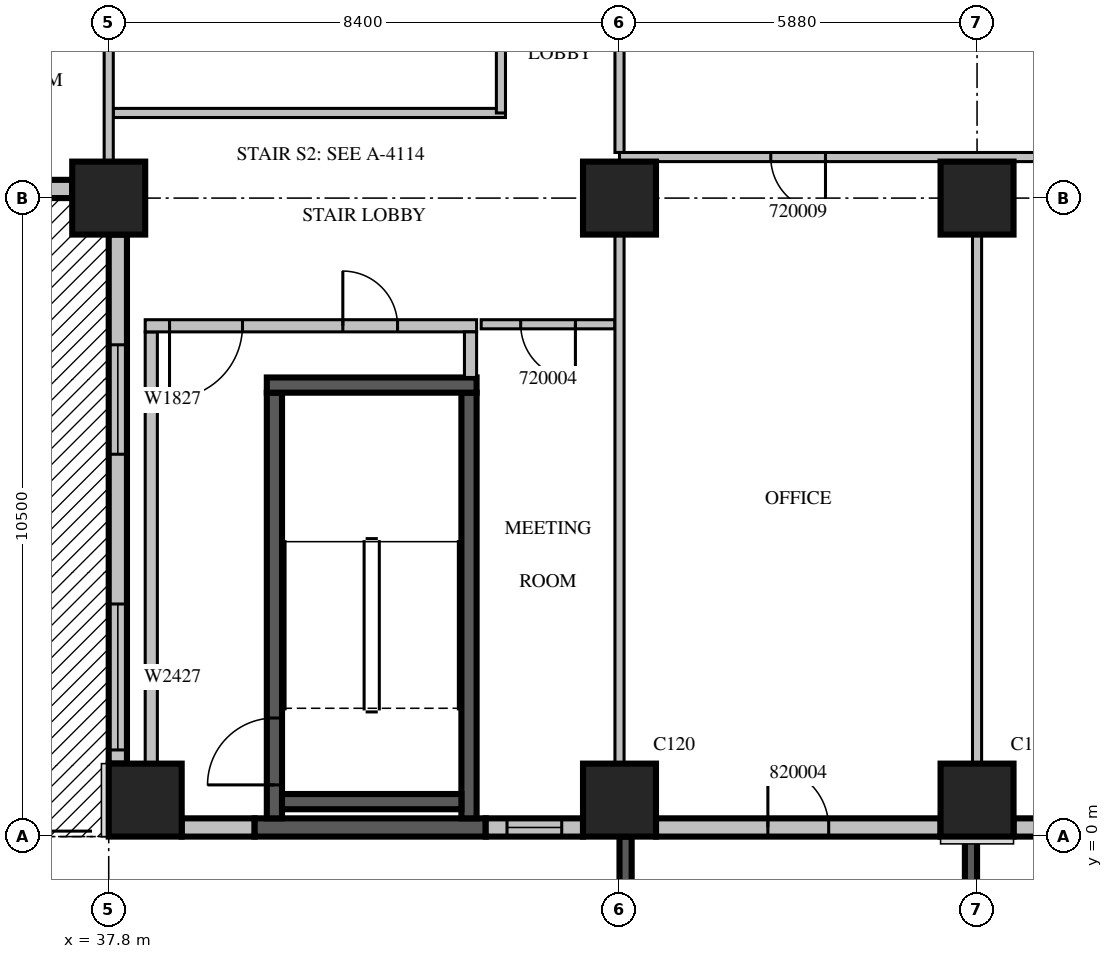
"""IFC4 building model, lengths in metres.
Left out: names, types, materials, properties, quantities, classifications, styles, units other than length and angle.
Written with IfcOpenShell. Run it as: python <this file> out.ifc"""

import sys

from ifc_helpers import new_model, si_unit, direction, frame, frame_2d, origin, origin_2d, place, context, subcontext, project, spatial, rectangle, extrude, source, transform, mapped, element, fill, save


model = new_model("IFC4")
c1 = context("Model", 3, precision=1e-05, world=origin(), true_north=direction((0.0, 1.0)))
c2 = subcontext(c1, "Body", "Model", "MODEL_VIEW")
j1 = project(units=[si_unit("LENGTHUNIT", "METRE"), si_unit("PLANEANGLEUNIT", "RADIAN")], contexts=[c1])
p1 = place(None, origin())
s1 = spatial("IfcSite", under=j1, at=p1, CompositionType="ELEMENT")
p2 = place(p1, origin())
s2 = spatial("IfcBuilding", under=s1, at=p2, CompositionType="ELEMENT")
p3 = place(p2, frame((0.0, 0.0, 95.1)))
s3 = spatial("IfcBuildingStorey", under=s2, at=p3, CompositionType="ELEMENT", Elevation=95.1)
m1 = source(origin(), c2, "Body", "SweptSolid", [
    extrude(rectangle(XDim=1.2, YDim=1.2, at=origin_2d()), origin(), (0.0, 0.0, 1.0), 4.2),
])
for number, where, z_axis, x_axis in (
    (1, (38.4, 0.6, 0.0), (0.0, 0.0, 1.0), (1.0, 0.0, 0.0)),
    (2, (46.2, 0.6, 0.0), (0.0, 0.0, 1.0), (1.0, 0.0, 0.0)),
    (3, (52.08, 0.6, 0.0), (0.0, 0.0, 1.0), (1.0, 0.0, 0.0)),
    (4, (37.8, 10.5, 0.0), (0.0, 0.0, 1.0), (1.0, 0.0, 0.0)),
    (5, (46.2, 10.5, 0.0), (0.0, 0.0, 1.0), (1.0, 0.0, 0.0)),
    (6, (52.08, 10.5, 0.0), (0.0, 0.0, 1.0), (1.0, 0.0, 0.0)),
):
    element("IfcColumn", number, at=place(p3, frame(where, z_axis=z_axis, x_axis=x_axis)), inside=s3, PredefinedType="COLUMN", context=c2, shape_type="MappedRepresentation", body=[
        mapped(m1, transform((0.0, 0.0, 0.0), scale=1.0)),
    ])
m2 = source(origin(), c2, "Body", "SweptSolid", [
    extrude(rectangle(XDim=7.2, YDim=0.3, at=frame_2d((3.6, 0.0))), origin(), (0.0, 0.0, 1.0), 3.8),
])
p4 = place(p3, frame((30.0, 10.65, 0.0), z_axis=(0.0, 0.0, 1.0), x_axis=(1.0, 0.0, 0.0)))
e7 = element("IfcWall", 7, at=p4, inside=s3, PredefinedType="STANDARD", context=c2, shape_type="MappedRepresentation", body=[
    mapped(m2, transform((0.0, 0.0, 0.0), scale=1.0)),
])
m3 = source(origin(), c2, "Body", "SweptSolid", [
    extrude(rectangle(XDim=1.8, YDim=2.4, at=frame_2d((0.9, 1.2))), frame((0.0, 0.16, 0.0), z_axis=(0.0, -1.0, 0.0), x_axis=(1.0, 0.0, 0.0)), (0.0, 0.0, 1.0), 0.32),
])
p5 = place(p4, frame((0.6, 0.0, 0.0)))
e8 = element("IfcOpeningElement", 8, at=p5, cuts=e7, PredefinedType="OPENING", context=c2, shape_type="MappedRepresentation", body=[
    mapped(m3, transform((0.0, 0.0, 0.0), scale=1.0)),
])
m4 = source(origin(), c2, "Body", "SweptSolid", [
    extrude(rectangle(XDim=1.2, YDim=2.7, at=frame_2d((0.6, 1.35))), frame((0.0, 0.16, 0.0), z_axis=(0.0, -1.0, 0.0), x_axis=(1.0, 0.0, 0.0)), (0.0, 0.0, 1.0), 0.32),
])
p6 = place(p4, frame((3.807, 0.0, 0.6)))
e9 = element("IfcOpeningElement", 9, at=p6, cuts=e7, PredefinedType="OPENING", context=c2, shape_type="MappedRepresentation", body=[
    mapped(m4, transform((0.0, 0.0, 0.0), scale=1.0)),
])
m5 = source(origin(), c2, "Body", "SweptSolid", [
    extrude(rectangle(XDim=8.7, YDim=0.3, at=frame_2d((4.35, 0.0))), origin(), (0.0, 0.0, 1.0), 3.8),
])
p7 = place(p3, frame((37.95, 9.9, 0.0), z_axis=(0.0, 0.0, 1.0), x_axis=(0.0, -1.0, 0.0)))
e10 = element("IfcWall", 10, at=p7, inside=s3, PredefinedType="STANDARD", context=c2, shape_type="MappedRepresentation", body=[
    mapped(m5, transform((0.0, 0.0, 0.0), scale=1.0)),
])
m6 = source(origin(), c2, "Body", "SweptSolid", [
    extrude(rectangle(XDim=1.8, YDim=2.7, at=frame_2d((0.9, 1.35))), frame((0.0, 0.16, 0.0), z_axis=(0.0, -1.0, 0.0), x_axis=(1.0, 0.0, 0.0)), (0.0, 0.0, 1.0), 0.32),
])
p8 = place(p7, frame((1.812, 0.0, 0.6)))
e11 = element("IfcOpeningElement", 11, at=p8, cuts=e10, PredefinedType="OPENING", context=c2, shape_type="MappedRepresentation", body=[
    mapped(m6, transform((0.0, 0.0, 0.0), scale=1.0)),
])
m7 = source(origin(), c2, "Body", "SweptSolid", [
    extrude(rectangle(XDim=2.4, YDim=2.7, at=frame_2d((1.2, 1.35))), frame((0.0, 0.16, 0.0), z_axis=(0.0, -1.0, 0.0), x_axis=(1.0, 0.0, 0.0)), (0.0, 0.0, 1.0), 0.32),
])
p9 = place(p7, frame((6.075, 0.0, 0.6)))
e12 = element("IfcOpeningElement", 12, at=p9, cuts=e10, PredefinedType="OPENING", context=c2, shape_type="MappedRepresentation", body=[
    mapped(m7, transform((0.0, 0.0, 0.0), scale=1.0)),
])
m8 = source(origin(), c2, "Body", "SweptSolid", [
    extrude(rectangle(XDim=1.2, YDim=0.3, at=frame_2d((0.6, 0.0))), origin(), (0.0, 0.0, 1.0), 3.8),
])
p10 = place(p3, frame((39.0, 0.15, 0.0), z_axis=(0.0, 0.0, 1.0), x_axis=(1.0, 0.0, 0.0)))
e13 = element("IfcWall", 13, at=p10, inside=s3, PredefinedType="STANDARD", context=c2, shape_type="MappedRepresentation", body=[
    mapped(m8, transform((0.0, 0.0, 0.0), scale=1.0)),
])
m9 = source(origin(), c2, "Body", "SweptSolid", [
    extrude(rectangle(XDim=3.8, YDim=0.3, at=frame_2d((1.9, 0.0))), origin(), (0.0, 0.0, 1.0), 3.8),
])
p11 = place(p3, frame((40.2, 0.15, 0.0), z_axis=(0.0, 0.0, 1.0), x_axis=(1.0, 0.0, 0.0)))
e14 = element("IfcWall", 14, at=p11, inside=s3, PredefinedType="SOLIDWALL", context=c2, shape_type="MappedRepresentation", body=[
    mapped(m9, transform((0.0, 0.0, 0.0), scale=1.0)),
])
m10 = source(origin(), c2, "Body", "SweptSolid", [
    extrude(rectangle(XDim=1.6, YDim=0.3, at=frame_2d((0.8, 0.0))), origin(), (0.0, 0.0, 1.0), 3.8),
])
p12 = place(p3, frame((44.0, 0.15, 0.0), z_axis=(0.0, 0.0, 1.0), x_axis=(1.0, 0.0, 0.0)))
e15 = element("IfcWall", 15, at=p12, inside=s3, PredefinedType="STANDARD", context=c2, shape_type="MappedRepresentation", body=[
    mapped(m10, transform((0.0, 0.0, 0.0), scale=1.0)),
])
m11 = source(origin(), c2, "Body", "SweptSolid", [
    extrude(rectangle(XDim=0.9, YDim=2.7, at=frame_2d((0.45, 1.35))), frame((0.0, 0.16, 0.0), z_axis=(0.0, -1.0, 0.0), x_axis=(1.0, 0.0, 0.0)), (0.0, 0.0, 1.0), 0.32),
])
p13 = place(p12, frame((0.35, 0.0, 0.6)))
e16 = element("IfcOpeningElement", 16, at=p13, cuts=e15, PredefinedType="OPENING", context=c2, shape_type="MappedRepresentation", body=[
    mapped(m11, transform((0.0, 0.0, 0.0), scale=1.0)),
])
m12 = source(origin(), c2, "Body", "SweptSolid", [
    extrude(rectangle(XDim=4.68, YDim=0.3, at=frame_2d((2.34, 0.0))), origin(), (0.0, 0.0, 1.0), 3.8),
])
p14 = place(p3, frame((46.8, 0.15, 0.0), z_axis=(0.0, 0.0, 1.0), x_axis=(1.0, 0.0, 0.0)))
e17 = element("IfcWall", 17, at=p14, inside=s3, PredefinedType="STANDARD", context=c2, shape_type="MappedRepresentation", body=[
    mapped(m12, transform((0.0, 0.0, 0.0), scale=1.0)),
])
m13 = source(origin(), c2, "Body", "SweptSolid", [
    extrude(rectangle(XDim=1.0, YDim=2.1, at=frame_2d((0.5, 1.05))), frame((0.0, 0.16, 0.0), z_axis=(0.0, -1.0, 0.0), x_axis=(1.0, 0.0, 0.0)), (0.0, 0.0, 1.0), 0.32),
])
p15 = place(p14, frame((1.84, 0.0, 0.0)))
e18 = element("IfcOpeningElement", 18, at=p15, cuts=e17, PredefinedType="OPENING", context=c2, shape_type="MappedRepresentation", body=[
    mapped(m13, transform((0.0, 0.0, 0.0), scale=1.0)),
])
p16 = place(p3, frame((52.68, 0.15, 0.0), z_axis=(0.0, 0.0, 1.0), x_axis=(1.0, 0.0, 0.0)))
e19 = element("IfcWall", 19, at=p16, inside=s3, PredefinedType="STANDARD", context=c2, shape_type="MappedRepresentation", body=[
    mapped(m12, transform((0.0, 0.0, 0.0), scale=1.0)),
])
m14 = source(origin(), c2, "Body", "SweptSolid", [
    extrude(rectangle(XDim=3.6, YDim=2.7, at=frame_2d((1.8, 1.35))), frame((0.0, 0.16, 0.0), z_axis=(0.0, -1.0, 0.0), x_axis=(1.0, 0.0, 0.0)), (0.0, 0.0, 1.0), 0.32),
])
p17 = place(p16, frame((0.54, 0.0, 0.6)))
e20 = element("IfcOpeningElement", 20, at=p17, cuts=e19, PredefinedType="OPENING", context=c2, shape_type="MappedRepresentation", body=[
    mapped(m14, transform((0.0, 0.0, 0.0), scale=1.0)),
])
m15 = source(origin(), c2, "Body", "SweptSolid", [
    extrude(rectangle(XDim=3.9, YDim=0.2, at=frame_2d((1.95, 0.0))), origin(), (0.0, 0.0, 1.0), 3.79),
])
p18 = place(p3, frame((46.3, 0.0, 0.0), z_axis=(0.0, 0.0, 1.0), x_axis=(0.0, -1.0, 0.0)))
e21 = element("IfcWall", 21, at=p18, inside=s3, PredefinedType="SOLIDWALL", context=c2, shape_type="MappedRepresentation", body=[
    mapped(m15, transform((0.0, 0.0, 0.0), scale=1.0)),
])
m16 = source(origin(), c2, "Body", "SweptSolid", [
    extrude(rectangle(XDim=2.4, YDim=2.7, at=frame_2d((1.2, 1.35))), frame((0.0, 0.11, 0.0), z_axis=(0.0, -1.0, 0.0), x_axis=(1.0, 0.0, 0.0)), (0.0, 0.0, 1.0), 0.22),
])
p19 = place(p18, frame((0.75, 0.0, 0.6)))
e22 = element("IfcOpeningElement", 22, at=p19, cuts=e21, PredefinedType="OPENING", context=c2, shape_type="MappedRepresentation", body=[
    mapped(m16, transform((0.0, 0.0, 0.0), scale=1.0)),
])
p20 = place(p3, frame((51.98, 0.0, 0.0), z_axis=(0.0, 0.0, 1.0), x_axis=(0.0, -1.0, 0.0)))
e23 = element("IfcWall", 23, at=p20, inside=s3, PredefinedType="SOLIDWALL", context=c2, shape_type="MappedRepresentation", body=[
    mapped(m15, transform((0.0, 0.0, 0.0), scale=1.0)),
])
p21 = place(p20, frame((0.75, 0.0, 0.6)))
e24 = element("IfcOpeningElement", 24, at=p21, cuts=e23, PredefinedType="OPENING", context=c2, shape_type="MappedRepresentation", body=[
    mapped(m16, transform((0.0, 0.0, 0.0), scale=1.0)),
])
m17 = source(origin(), c2, "Body", "SweptSolid", [
    extrude(rectangle(XDim=7.0, YDim=0.25, at=frame_2d((3.5, 0.0))), origin(), (0.0, 0.0, 1.0), 3.8),
])
p22 = place(p3, frame((40.525, 0.3, 0.0), z_axis=(0.0, 0.0, 1.0), x_axis=(0.0, 1.0, 0.0)))
e25 = element("IfcWall", 25, at=p22, inside=s3, PredefinedType="SOLIDWALL", context=c2, shape_type="MappedRepresentation", body=[
    mapped(m17, transform((0.0, 0.0, 0.0), scale=1.0)),
])
m18 = source(origin(), c2, "Body", "SweptSolid", [
    extrude(rectangle(XDim=1.1, YDim=2.1, at=frame_2d((0.55, 1.05))), frame((0.0, 0.135, 0.0), z_axis=(0.0, -1.0, 0.0), x_axis=(1.0, 0.0, 0.0)), (0.0, 0.0, 1.0), 0.27),
])
p23 = place(p22, frame((0.55, 0.0, 0.0)))
e26 = element("IfcOpeningElement", 26, at=p23, cuts=e25, PredefinedType="OPENING", context=c2, shape_type="MappedRepresentation", body=[
    mapped(m18, transform((0.0, 0.0, 0.0), scale=1.0)),
])
p24 = place(p3, frame((43.725, 0.3, 0.0), z_axis=(0.0, 0.0, 1.0), x_axis=(0.0, 1.0, 0.0)))
e27 = element("IfcWall", 27, at=p24, inside=s3, PredefinedType="SOLIDWALL", context=c2, shape_type="MappedRepresentation", body=[
    mapped(m17, transform((0.0, 0.0, 0.0), scale=1.0)),
])
m19 = source(origin(), c2, "Body", "SweptSolid", [
    extrude(rectangle(XDim=3.45, YDim=0.25, at=frame_2d((1.725, 0.0))), origin(), (0.0, 0.0, 1.0), 3.8),
])
p25 = place(p3, frame((40.4, 7.425, 0.0), z_axis=(0.0, 0.0, 1.0), x_axis=(1.0, 0.0, 0.0)))
e28 = element("IfcWall", 28, at=p25, inside=s3, PredefinedType="SOLIDWALL", context=c2, shape_type="MappedRepresentation", body=[
    mapped(m19, transform((0.0, 0.0, 0.0), scale=1.0)),
])
m20 = source(origin(), c2, "Body", "SweptSolid", [
    extrude(rectangle(XDim=2.95, YDim=0.25, at=frame_2d((1.475, 0.0))), origin(), (0.0, 0.0, 1.0), 3.8),
])
p26 = place(p3, frame((40.65, 0.575, 0.0), z_axis=(0.0, 0.0, 1.0), x_axis=(1.0, 0.0, 0.0)))
e29 = element("IfcWall", 29, at=p26, inside=s3, PredefinedType="SOLIDWALL", context=c2, shape_type="MappedRepresentation", body=[
    mapped(m20, transform((0.0, 0.0, 0.0), scale=1.0)),
])
m21 = source(origin(), c2, "Body", "SweptSolid", [
    extrude(rectangle(XDim=8.0, YDim=0.2, at=frame_2d((4.0, 0.0))), origin(), (0.0, 0.0, 1.0), 3.8),
])
p27 = place(p3, frame((38.5, 0.3, 0.0), z_axis=(0.0, 0.0, 1.0), x_axis=(0.0, 1.0, 0.0)))
e30 = element("IfcWall", 30, at=p27, inside=s3, PredefinedType="PARTITIONING", context=c2, shape_type="MappedRepresentation", body=[
    mapped(m21, transform((0.0, 0.0, 0.0), scale=1.0)),
])
m22 = source(origin(), c2, "Body", "SweptSolid", [
    extrude(rectangle(XDim=5.45, YDim=0.2, at=frame_2d((2.725, 0.0))), origin(), (0.0, 0.0, 1.0), 3.8),
])
p28 = place(p3, frame((38.4, 8.4, 0.0), z_axis=(0.0, 0.0, 1.0), x_axis=(1.0, 0.0, 0.0)))
e31 = element("IfcWall", 31, at=p28, inside=s3, PredefinedType="PARTITIONING", context=c2, shape_type="MappedRepresentation", body=[
    mapped(m22, transform((0.0, 0.0, 0.0), scale=1.0)),
])
m23 = source(origin(), c2, "Body", "SweptSolid", [
    extrude(rectangle(XDim=1.2, YDim=2.1, at=frame_2d((0.6, 1.05))), frame((0.0, 0.11, 0.0), z_axis=(0.0, -1.0, 0.0), x_axis=(1.0, 0.0, 0.0)), (0.0, 0.0, 1.0), 0.22),
])
p29 = place(p28, frame((0.4, 0.0, 0.0)))
e32 = element("IfcOpeningElement", 32, at=p29, cuts=e31, PredefinedType="OPENING", context=c2, shape_type="MappedRepresentation", body=[
    mapped(m23, transform((0.0, 0.0, 0.0), scale=1.0)),
])
m24 = source(origin(), c2, "Body", "SweptSolid", [
    extrude(rectangle(XDim=0.9, YDim=2.1, at=frame_2d((0.45, 1.05))), frame((0.0, 0.11, 0.0), z_axis=(0.0, -1.0, 0.0), x_axis=(1.0, 0.0, 0.0)), (0.0, 0.0, 1.0), 0.22),
])
p30 = place(p28, frame((3.25, 0.0, 0.0)))
e33 = element("IfcOpeningElement", 33, at=p30, cuts=e31, PredefinedType="OPENING", context=c2, shape_type="MappedRepresentation", body=[
    mapped(m24, transform((0.0, 0.0, 0.0), scale=1.0)),
])
m25 = source(origin(), c2, "Body", "SweptSolid", [
    extrude(rectangle(XDim=0.75, YDim=0.2, at=frame_2d((0.375, 0.0))), origin(), (0.0, 0.0, 1.0), 3.8),
])
p31 = place(p3, frame((43.75, 7.55, 0.0), z_axis=(0.0, 0.0, 1.0), x_axis=(0.0, 1.0, 0.0)))
e34 = element("IfcWall", 34, at=p31, inside=s3, PredefinedType="PARTITIONING", context=c2, shape_type="MappedRepresentation", body=[
    mapped(m25, transform((0.0, 0.0, 0.0), scale=1.0)),
])
m26 = source(origin(), c2, "Body", "SweptSolid", [
    extrude(rectangle(XDim=6.45, YDim=0.15, at=frame_2d((3.225, 0.0))), origin(), (0.0, 0.0, 1.0), 3.8),
])
p32 = place(p3, frame((37.875, 11.9, 0.0), z_axis=(0.0, 0.0, 1.0), x_axis=(1.0, 0.0, 0.0)))
e35 = element("IfcWall", 35, at=p32, inside=s3, PredefinedType="PARTITIONING", context=c2, shape_type="MappedRepresentation", body=[
    mapped(m26, transform((0.0, 0.0, 0.0), scale=1.0)),
])
m27 = source(origin(), c2, "Body", "SweptSolid", [
    extrude(rectangle(XDim=3.175, YDim=0.15, at=frame_2d((1.587, 0.0))), origin(), (0.0, 0.0, 1.0), 3.8),
])
p33 = place(p3, frame((44.25, 11.9, 0.0), z_axis=(0.0, 0.0, 1.0), x_axis=(0.0, 1.0, 0.0)))
e36 = element("IfcWall", 36, at=p33, inside=s3, PredefinedType="PARTITIONING", context=c2, shape_type="MappedRepresentation", body=[
    mapped(m27, transform((0.0, 0.0, 0.0), scale=1.0)),
])
m28 = source(origin(), c2, "Body", "SweptSolid", [
    extrude(rectangle(XDim=2.2, YDim=0.15, at=frame_2d((1.1, 0.0))), origin(), (0.0, 0.0, 1.0), 3.8),
])
p34 = place(p3, frame((46.125, 8.425, 0.0), z_axis=(0.0, 0.0, 1.0), x_axis=(-1.0, 0.0, 0.0)))
e37 = element("IfcWall", 37, at=p34, inside=s3, PredefinedType="PARTITIONING", context=c2, shape_type="MappedRepresentation", body=[
    mapped(m28, transform((0.0, 0.0, 0.0), scale=1.0)),
])
m29 = source(origin(), c2, "Body", "SweptSolid", [
    extrude(rectangle(XDim=0.9, YDim=2.1, at=frame_2d((0.45, 1.05))), frame((0.0, 0.085, 0.0), z_axis=(0.0, -1.0, 0.0), x_axis=(1.0, 0.0, 0.0)), (0.0, 0.0, 1.0), 0.17),
])
p35 = place(p34, frame((0.65, 0.0, 0.0)))
e38 = element("IfcOpeningElement", 38, at=p35, cuts=e37, PredefinedType="OPENING", context=c2, shape_type="MappedRepresentation", body=[
    mapped(m29, transform((0.0, 0.0, 0.0), scale=1.0)),
])
m30 = source(origin(), c2, "Body", "SweptSolid", [
    extrude(rectangle(XDim=3.901, YDim=0.15, at=frame_2d((1.95, 0.0))), origin(), (0.0, 0.0, 1.0), 3.8),
])
p36 = place(p3, frame((37.8, 11.099, 0.0), z_axis=(0.0, 0.0, 1.0), x_axis=(0.0, 1.0, 0.0)))
e39 = element("IfcWall", 39, at=p36, inside=s3, PredefinedType="PARTITIONING", context=c2, shape_type="MappedRepresentation", body=[
    mapped(m30, transform((0.0, 0.0, 0.0), scale=1.0)),
])
m31 = source(origin(), c2, "Body", "SweptSolid", [
    extrude(rectangle(XDim=8.702, YDim=0.15, at=frame_2d((4.351, 0.0))), origin(), (0.0, 0.0, 1.0), 3.8),
])
for number, where, z_axis, x_axis in (
    (40, (52.08, 1.199, 0.0), (0.0, 0.0, 1.0), (0.0, 1.0, 0.0)),
    (41, (46.2, 1.199, 0.0), (0.0, 0.0, 1.0), (0.0, 1.0, 0.0)),
):
    element("IfcWall", number, at=place(p3, frame(where, z_axis=z_axis, x_axis=x_axis)), inside=s3, PredefinedType="PARTITIONING", context=c2, shape_type="MappedRepresentation", body=[
        mapped(m31, transform((0.0, 0.0, 0.0), scale=1.0)),
    ])
m32 = source(origin(), c2, "Body", "SweptSolid", [
    extrude(rectangle(XDim=3.75, YDim=0.15, at=frame_2d((1.875, 0.0))), origin(), (0.0, 0.0, 1.0), 3.8),
])
p37 = place(p3, frame((46.2, 11.25, 0.0), z_axis=(0.0, 0.0, 1.0), x_axis=(0.0, 1.0, 0.0)))
e42 = element("IfcWall", 42, at=p37, inside=s3, PredefinedType="PARTITIONING", context=c2, shape_type="MappedRepresentation", body=[
    mapped(m32, transform((0.0, 0.0, 0.0), scale=1.0)),
])
m33 = source(origin(), c2, "Body", "SweptSolid", [
    extrude(rectangle(XDim=24.9, YDim=0.15, at=frame_2d((12.45, 0.0))), origin(), (0.0, 0.0, 1.0), 3.8),
])
p38 = place(p3, frame((71.1, 11.175, 0.0), z_axis=(0.0, 0.0, 1.0), x_axis=(-1.0, 0.0, 0.0)))
e43 = element("IfcWall", 43, at=p38, inside=s3, PredefinedType="PARTITIONING", context=c2, shape_type="MappedRepresentation", body=[
    mapped(m33, transform((0.0, 0.0, 0.0), scale=1.0)),
])
p39 = place(p38, frame((21.512, 0.0, 0.0)))
e44 = element("IfcOpeningElement", 44, at=p39, cuts=e43, PredefinedType="OPENING", context=c2, shape_type="MappedRepresentation", body=[
    mapped(m29, transform((0.0, 0.0, 0.0), scale=1.0)),
])
p40 = place(p38, frame((15.633, 0.0, 0.0)))
e45 = element("IfcOpeningElement", 45, at=p40, cuts=e43, PredefinedType="OPENING", context=c2, shape_type="MappedRepresentation", body=[
    mapped(m29, transform((0.0, 0.0, 0.0), scale=1.0)),
])
p41 = place(p38, frame((9.752, 0.0, 0.0)))
e46 = element("IfcOpeningElement", 46, at=p41, cuts=e43, PredefinedType="OPENING", context=c2, shape_type="MappedRepresentation", body=[
    mapped(m29, transform((0.0, 0.0, 0.0), scale=1.0)),
])
m34 = source(origin(), c2, "Body", "SweptSolid", [
    extrude(rectangle(XDim=1.8, YDim=2.7, at=frame_2d((0.9, 1.35))), frame((0.0, 0.03, 0.0), z_axis=(0.0, -1.0, 0.0), x_axis=(1.0, 0.0, 0.0)), (0.0, 0.0, 1.0), 0.06),
])
p42 = place(p8, origin())
e47 = element("IfcWindow", 47, at=p42, inside=s3, PartitioningType="SINGLE_PANEL", PredefinedType="WINDOW", context=c2, shape_type="MappedRepresentation", body=[
    mapped(m34, transform((0.0, 0.0, 0.0), scale=1.0)),
])
fill(e11, e47)
m35 = source(origin(), c2, "Body", "SweptSolid", [
    extrude(rectangle(XDim=2.4, YDim=2.7, at=frame_2d((1.2, 1.35))), frame((0.0, 0.03, 0.0), z_axis=(0.0, -1.0, 0.0), x_axis=(1.0, 0.0, 0.0)), (0.0, 0.0, 1.0), 0.06),
])
p43 = place(p9, origin())
e48 = element("IfcWindow", 48, at=p43, inside=s3, PartitioningType="SINGLE_PANEL", PredefinedType="WINDOW", context=c2, shape_type="MappedRepresentation", body=[
    mapped(m35, transform((0.0, 0.0, 0.0), scale=1.0)),
])
fill(e12, e48)
m36 = source(origin(), c2, "Body", "SweptSolid", [
    extrude(rectangle(XDim=0.9, YDim=2.7, at=frame_2d((0.45, 1.35))), frame((0.0, 0.03, 0.0), z_axis=(0.0, -1.0, 0.0), x_axis=(1.0, 0.0, 0.0)), (0.0, 0.0, 1.0), 0.06),
])
p44 = place(p13, origin())
e49 = element("IfcWindow", 49, at=p44, inside=s3, PartitioningType="SINGLE_PANEL", PredefinedType="WINDOW", context=c2, shape_type="MappedRepresentation", body=[
    mapped(m36, transform((0.0, 0.0, 0.0), scale=1.0)),
])
fill(e16, e49)
m37 = source(origin(), c2, "Body", "SweptSolid", [
    extrude(rectangle(XDim=1.1, YDim=2.1, at=frame_2d((0.55, 1.05))), frame((0.0, 0.025, 0.0), z_axis=(0.0, -1.0, 0.0), x_axis=(1.0, 0.0, 0.0)), (0.0, 0.0, 1.0), 0.05),
])
p45 = place(p23, origin())
e50 = element("IfcDoor", 50, at=p45, inside=s3, OperationType="SINGLE_SWING_LEFT", PredefinedType="DOOR", context=c2, shape_type="MappedRepresentation", body=[
    mapped(m37, transform((0.0, 0.0, 0.0), scale=1.0)),
])
fill(e26, e50)
m38 = source(origin(), c2, "Body", "SweptSolid", [
    extrude(rectangle(XDim=1.2, YDim=2.1, at=frame_2d((0.6, 1.05))), frame((0.0, 0.025, 0.0), z_axis=(0.0, -1.0, 0.0), x_axis=(1.0, 0.0, 0.0)), (0.0, 0.0, 1.0), 0.05),
])
p46 = place(p29, origin())
e51 = element("IfcDoor", 51, at=p46, inside=s3, OperationType="SINGLE_SWING_RIGHT", PredefinedType="DOOR", context=c2, shape_type="MappedRepresentation", body=[
    mapped(m38, transform((0.0, 0.0, 0.0), scale=1.0)),
])
fill(e32, e51)
m39 = source(origin(), c2, "Body", "SweptSolid", [
    extrude(rectangle(XDim=0.9, YDim=2.1, at=frame_2d((0.45, 1.05))), frame((0.0, 0.025, 0.0), z_axis=(0.0, -1.0, 0.0), x_axis=(1.0, 0.0, 0.0)), (0.0, 0.0, 1.0), 0.05),
])
p47 = place(p30, origin())
e52 = element("IfcDoor", 52, at=p47, inside=s3, OperationType="SINGLE_SWING_LEFT", PredefinedType="DOOR", context=c2, shape_type="MappedRepresentation", body=[
    mapped(m39, transform((0.0, 0.0, 0.0), scale=1.0)),
])
fill(e33, e52)
p48 = place(p35, origin())
e53 = element("IfcDoor", 53, at=p48, inside=s3, OperationType="SINGLE_SWING_LEFT", PredefinedType="DOOR", context=c2, shape_type="MappedRepresentation", body=[
    mapped(m39, transform((0.0, 0.0, 0.0), scale=1.0)),
])
fill(e38, e53)
p49 = place(p39, origin())
e54 = element("IfcDoor", 54, at=p49, inside=s3, OperationType="SINGLE_SWING_LEFT", PredefinedType="DOOR", context=c2, shape_type="MappedRepresentation", body=[
    mapped(m39, transform((0.0, 0.0, 0.0), scale=1.0)),
])
fill(e44, e54)
m40 = source(origin(), c2, "Body", "SweptSolid", [
    extrude(rectangle(XDim=1.0, YDim=2.1, at=frame_2d((0.5, 1.05))), frame((0.0, 0.025, 0.0), z_axis=(0.0, -1.0, 0.0), x_axis=(1.0, 0.0, 0.0)), (0.0, 0.0, 1.0), 0.05),
])
p50 = place(p15, origin())
e55 = element("IfcDoor", 55, at=p50, inside=s3, OperationType="SINGLE_SWING_LEFT", PredefinedType="DOOR", context=c2, shape_type="MappedRepresentation", body=[
    mapped(m40, transform((0.0, 0.0, 0.0), scale=1.0)),
])
fill(e18, e55)
save(model, sys.argv[1])
